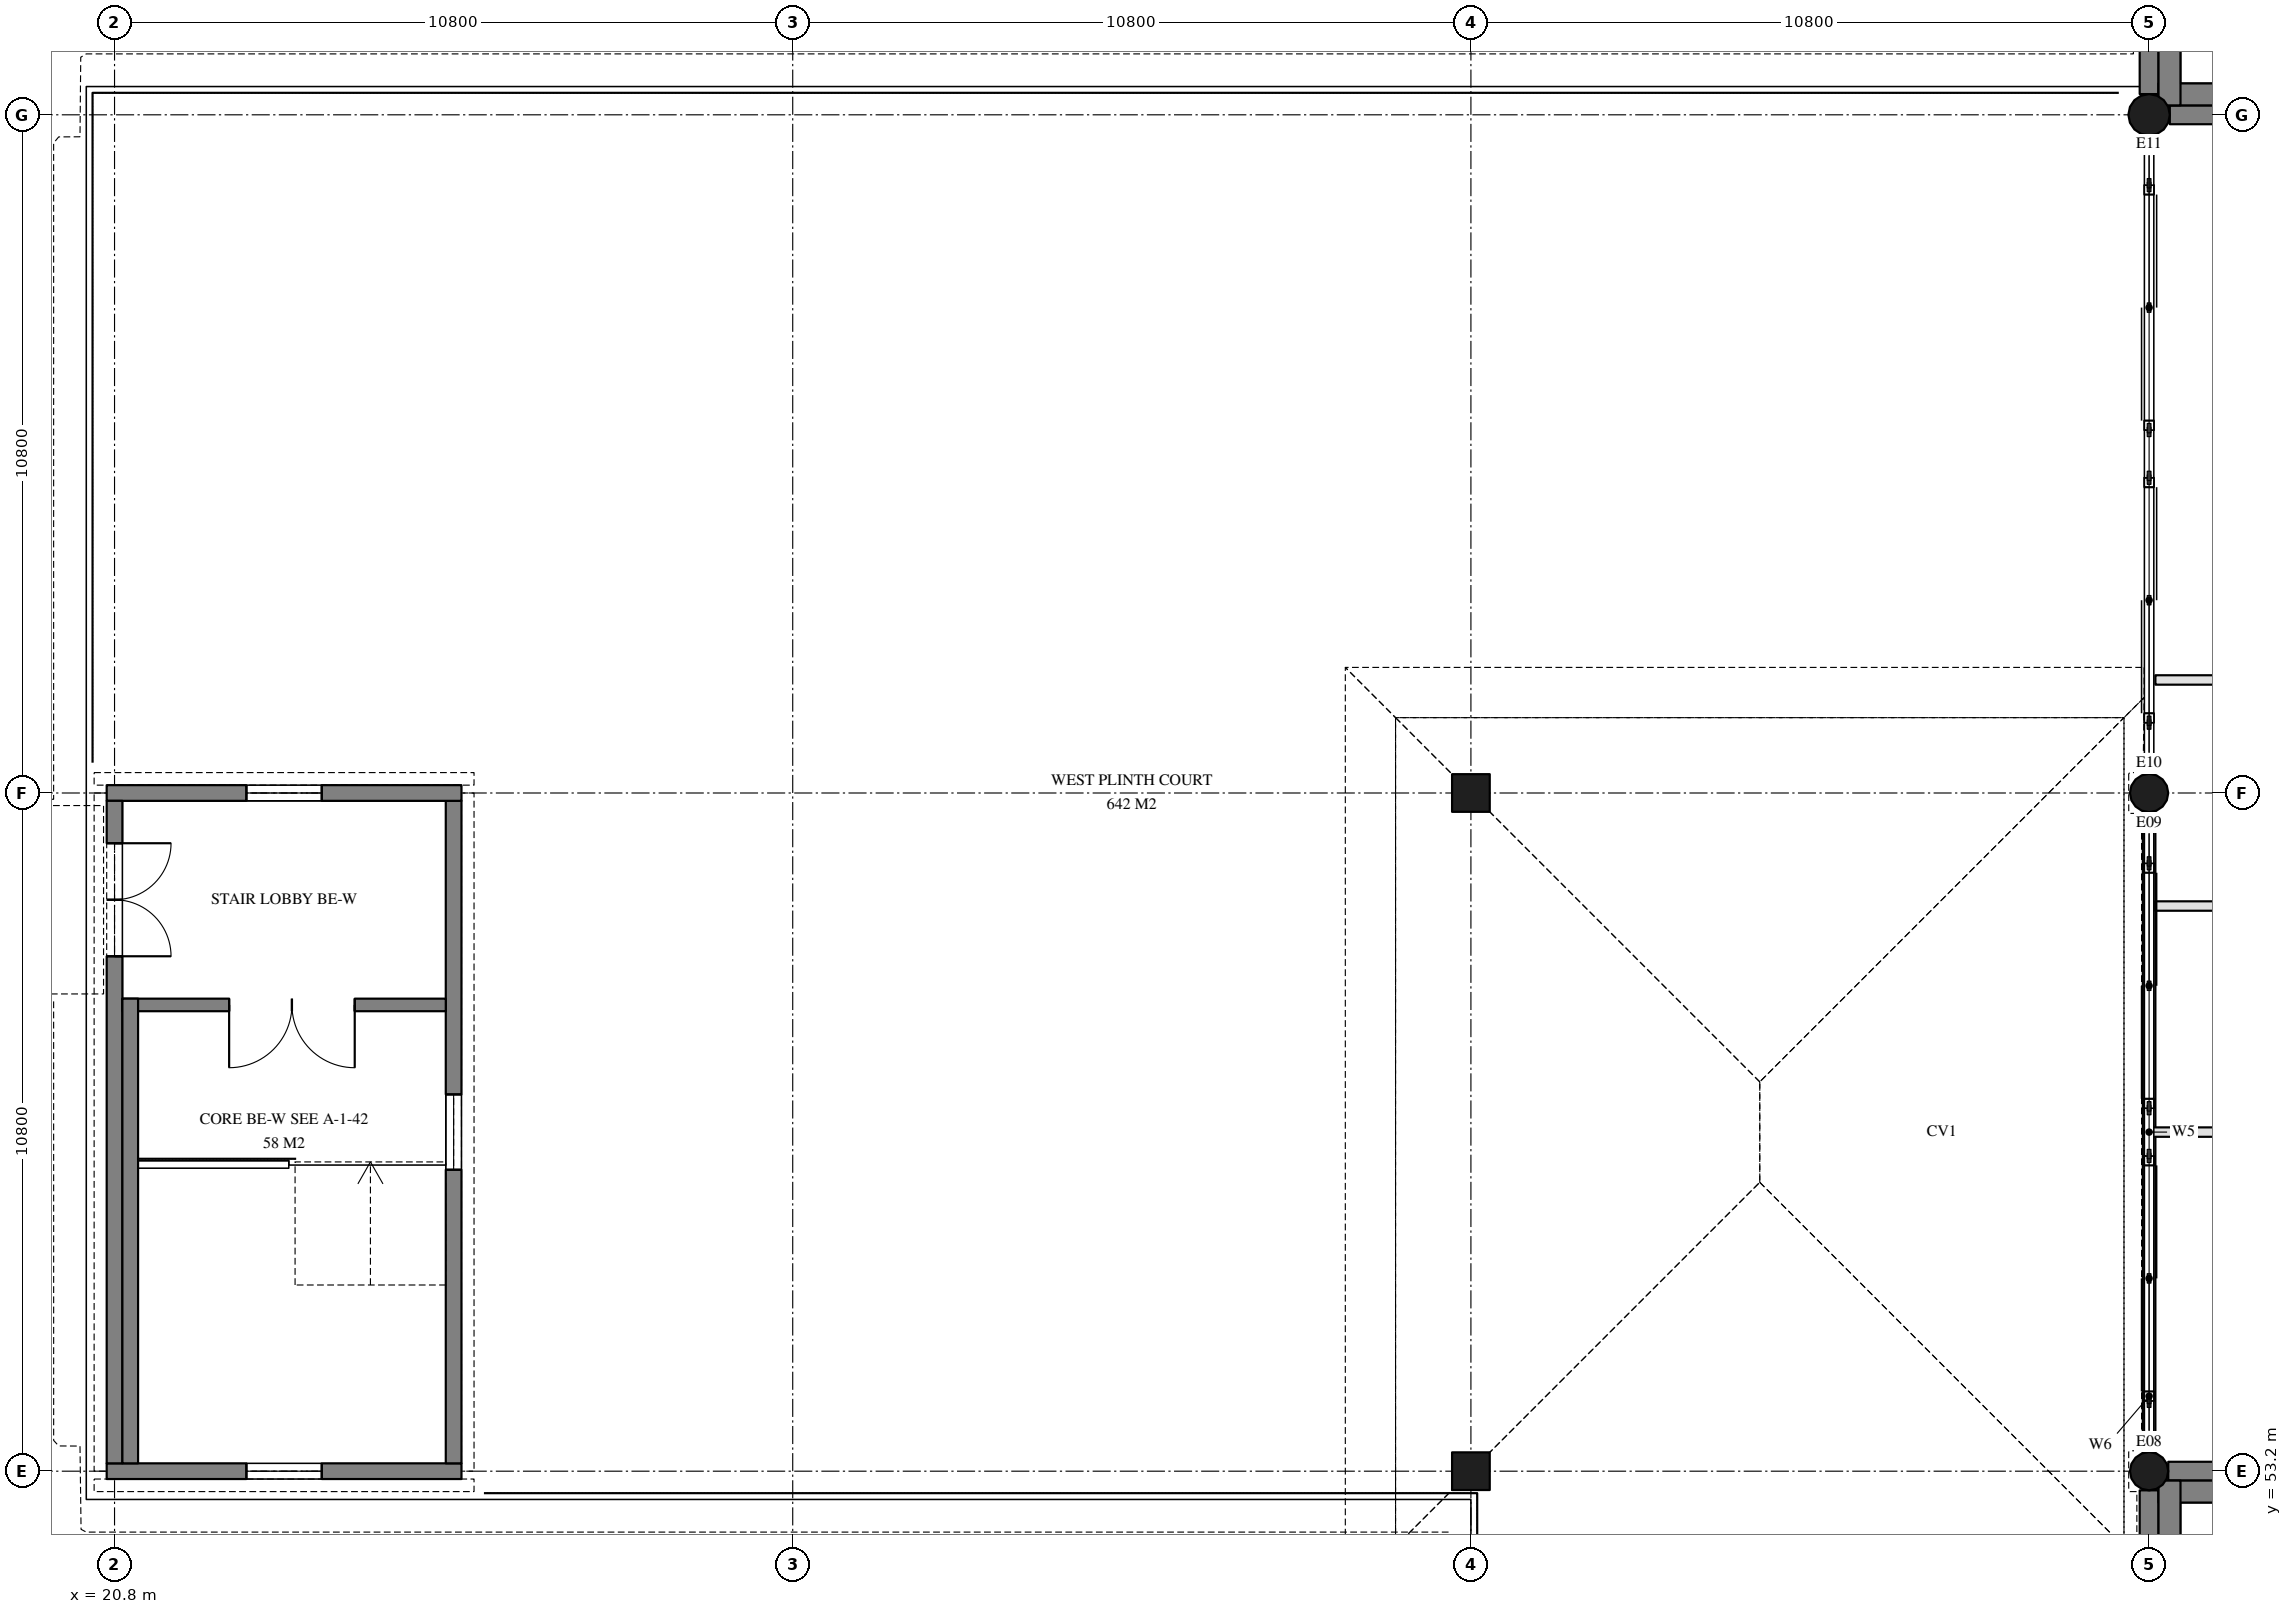
"""IFC4 building model, lengths in metres.
Left out: names, types, materials, properties, quantities, classifications, styles, units other than length and angle.
Written with IfcOpenShell. Run it as: python <this file> out.ifc"""

import sys

from ifc_helpers import new_model, si_unit, direction, frame, frame_2d, origin, origin_2d, place, context, subcontext, project, spatial, rectangle, hollow_circle, extrude, element, fill, save


model = new_model("IFC4")
c1 = context("Model", 3, precision=1e-05, world=origin(), true_north=direction((0.0, 1.0)))
c2 = subcontext(c1, "Body", "Model", "MODEL_VIEW")
j1 = project(units=[si_unit("LENGTHUNIT", "METRE"), si_unit("PLANEANGLEUNIT", "RADIAN")], contexts=[c1])
p1 = place(None, origin())
s1 = spatial("IfcSite", under=j1, at=p1, CompositionType="ELEMENT")
p2 = place(p1, origin())
s2 = spatial("IfcBuilding", under=s1, at=p2, CompositionType="ELEMENT")
p3 = place(p2, origin())
s3 = spatial("IfcBuildingStorey", under=s2, at=p3, CompositionType="ELEMENT", Elevation=0.0)
for number, where, z_axis, x_axis in (
    (1, (53.2, 53.2, 0.0), (0.0, 0.0, 1.0), (1.0, 0.0, 0.0)),
    (2, (53.2, 64.0, 0.0), (0.0, 0.0, 1.0), (1.0, 0.0, 0.0)),
):
    element("IfcColumn", number, at=place(p3, frame(where, z_axis=z_axis, x_axis=x_axis)), inside=s3, PredefinedType="COLUMN", context=c2, shape_type="SweptSolid", body=[
        extrude(hollow_circle(Radius=0.305, WallThickness=0.025, at=origin_2d()), origin(), (0.0, 0.0, 1.0), 4.8),
    ])
p4 = place(p3, frame((53.2, 74.8, 0.0), z_axis=(0.0, 0.0, 1.0), x_axis=(1.0, 0.0, 0.0)))
e3 = element("IfcColumn", 3, at=p4, inside=s3, PredefinedType="COLUMN", context=c2, shape_type="SweptSolid", body=[
    extrude(hollow_circle(Radius=0.33, WallThickness=0.025, at=origin_2d()), origin(), (0.0, 0.0, 1.0), 4.8),
])
for number, where, z_axis, x_axis in (
    (4, (42.4, 53.2, 0.0), (0.0, 0.0, 1.0), (1.0, 0.0, 0.0)),
    (5, (42.4, 64.0, 0.0), (0.0, 0.0, 1.0), (1.0, 0.0, 0.0)),
):
    element("IfcColumn", number, at=place(p3, frame(where, z_axis=z_axis, x_axis=x_axis)), inside=s3, PredefinedType="COLUMN", context=c2, shape_type="SweptSolid", body=[
        extrude(rectangle(XDim=0.6, YDim=0.6, at=origin_2d()), origin(), (0.0, 0.0, 1.0), 4.5),
    ])
p5 = place(p3, frame((53.53, 74.8, 0.0), z_axis=(0.0, 0.0, 1.0), x_axis=(1.0, 0.0, 0.0)))
e6 = element("IfcWall", 6, at=p5, inside=s3, PredefinedType="SOLIDWALL", context=c2, shape_type="SweptSolid", body=[
    extrude(rectangle(XDim=10.165, YDim=0.3, at=frame_2d((5.083, 0.0))), origin(), (0.0, 0.0, 1.0), 4.8),
])
p6 = place(p3, frame((53.2, 85.27, 0.0), z_axis=(0.0, 0.0, 1.0), x_axis=(0.0, -1.0, 0.0)))
e7 = element("IfcWall", 7, at=p6, inside=s3, PredefinedType="SOLIDWALL", context=c2, shape_type="SweptSolid", body=[
    extrude(rectangle(XDim=10.14, YDim=0.3, at=frame_2d((5.07, 0.0))), origin(), (0.0, 0.0, 1.0), 4.8),
])
p7 = place(p3, frame((63.72, 53.2, 0.0), z_axis=(0.0, 0.0, 1.0), x_axis=(-1.0, 0.0, 0.0)))
e8 = element("IfcWall", 8, at=p7, inside=s3, PredefinedType="SOLIDWALL", context=c2, shape_type="SweptSolid", body=[
    extrude(rectangle(XDim=10.216, YDim=0.3, at=frame_2d((5.108, 0.0))), origin(), (0.0, 0.0, 1.0), 4.8),
])
p8 = place(p3, frame((53.2, 52.895, 0.0), z_axis=(0.0, 0.0, 1.0), x_axis=(0.0, -1.0, 0.0)))
e9 = element("IfcWall", 9, at=p8, inside=s3, PredefinedType="SOLIDWALL", context=c2, shape_type="SweptSolid", body=[
    extrude(rectangle(XDim=10.19, YDim=0.3, at=frame_2d((5.095, 0.0))), origin(), (0.0, 0.0, 1.0), 4.8),
])
p9 = place(p3, frame((20.675, 53.2, 0.0), z_axis=(0.0, 0.0, 1.0), x_axis=(1.0, 0.0, 0.0)))
e10 = element("IfcWall", 10, at=p9, inside=s3, PredefinedType="SOLIDWALL", context=c2, shape_type="SweptSolid", body=[
    extrude(rectangle(XDim=5.65, YDim=0.25, at=frame_2d((2.825, 0.0))), origin(), (0.0, 0.0, 1.0), 4.8),
])
p10 = place(p9, frame((2.225, 0.0, 0.9)))
e11 = element("IfcOpeningElement", 11, at=p10, cuts=e10, PredefinedType="OPENING", context=c2, shape_type="SweptSolid", body=[
    extrude(rectangle(XDim=1.2, YDim=1.8, at=frame_2d((0.6, 0.9))), frame((0.0, 0.135, 0.0), z_axis=(0.0, -1.0, 0.0), x_axis=(1.0, 0.0, 0.0)), (0.0, 0.0, 1.0), 0.27),
])
p11 = place(p3, frame((26.2, 53.325, 0.0), z_axis=(0.0, 0.0, 1.0), x_axis=(0.0, 1.0, 0.0)))
e12 = element("IfcWall", 12, at=p11, inside=s3, PredefinedType="SOLIDWALL", context=c2, shape_type="SweptSolid", body=[
    extrude(rectangle(XDim=10.55, YDim=0.25, at=frame_2d((5.275, 0.0))), origin(), (0.0, 0.0, 1.0), 4.8),
])
p12 = place(p11, frame((4.675, 0.0, 0.9)))
e13 = element("IfcOpeningElement", 13, at=p12, cuts=e12, PredefinedType="OPENING", context=c2, shape_type="SweptSolid", body=[
    extrude(rectangle(XDim=1.2, YDim=1.8, at=frame_2d((0.6, 0.9))), frame((0.0, 0.135, 0.0), z_axis=(0.0, -1.0, 0.0), x_axis=(1.0, 0.0, 0.0)), (0.0, 0.0, 1.0), 0.27),
])
p13 = place(p3, frame((26.325, 64.0, 0.0), z_axis=(0.0, 0.0, 1.0), x_axis=(-1.0, 0.0, 0.0)))
e14 = element("IfcWall", 14, at=p13, inside=s3, PredefinedType="SOLIDWALL", context=c2, shape_type="SweptSolid", body=[
    extrude(rectangle(XDim=5.65, YDim=0.25, at=frame_2d((2.825, 0.0))), origin(), (0.0, 0.0, 1.0), 4.8),
])
p14 = place(p13, frame((2.225, 0.0, 0.9)))
e15 = element("IfcOpeningElement", 15, at=p14, cuts=e14, PredefinedType="OPENING", context=c2, shape_type="SweptSolid", body=[
    extrude(rectangle(XDim=1.2, YDim=1.8, at=frame_2d((0.6, 0.9))), frame((0.0, 0.135, 0.0), z_axis=(0.0, -1.0, 0.0), x_axis=(1.0, 0.0, 0.0)), (0.0, 0.0, 1.0), 0.27),
])
p15 = place(p3, frame((20.8, 63.875, 0.0), z_axis=(0.0, 0.0, 1.0), x_axis=(0.0, -1.0, 0.0)))
e16 = element("IfcWall", 16, at=p15, inside=s3, PredefinedType="SOLIDWALL", context=c2, shape_type="SweptSolid", body=[
    extrude(rectangle(XDim=10.55, YDim=0.25, at=frame_2d((5.275, 0.0))), origin(), (0.0, 0.0, 1.0), 4.8),
])
p16 = place(p15, frame((0.675, 0.0, 0.0)))
e17 = element("IfcOpeningElement", 17, at=p16, cuts=e16, PredefinedType="OPENING", context=c2, shape_type="SweptSolid", body=[
    extrude(rectangle(XDim=1.8, YDim=2.4, at=frame_2d((0.9, 1.2))), frame((0.0, 0.135, 0.0), z_axis=(0.0, -1.0, 0.0), x_axis=(1.0, 0.0, 0.0)), (0.0, 0.0, 1.0), 0.27),
])
p17 = place(p3, frame((53.2, 53.48, 4.5), z_axis=(0.0, 0.0, 1.0), x_axis=(0.0, 1.0, 0.0)))
e18 = element("IfcWall", 18, at=p17, inside=s3, PredefinedType="SOLIDWALL", context=c2, shape_type="SweptSolid", body=[
    extrude(rectangle(XDim=10.24, YDim=0.2, at=frame_2d((5.12, 0.0))), origin(), (0.0, 0.0, 1.0), 0.3),
])
p18 = place(p3, frame((53.2, 54.32, 0.0), z_axis=(0.0, 0.0, 1.0), x_axis=(0.0, 1.0, 0.0)))
e19 = element("IfcWall", 19, at=p18, inside=s3, PredefinedType="SOLIDWALL", context=c2, shape_type="SweptSolid", body=[
    extrude(rectangle(XDim=3.9, YDim=0.15, at=frame_2d((1.95, 0.0))), origin(), (0.0, 0.0, 1.0), 2.6),
])
p19 = place(p18, frame((0.15, 0.0, 0.0)))
e20 = element("IfcOpeningElement", 20, at=p19, cuts=e19, PredefinedType="OPENING", context=c2, shape_type="SweptSolid", body=[
    extrude(rectangle(XDim=3.6, YDim=2.4, at=frame_2d((1.8, 1.2))), frame((0.0, 0.085, 0.0), z_axis=(0.0, -1.0, 0.0), x_axis=(1.0, 0.0, 0.0)), (0.0, 0.0, 1.0), 0.17),
])
p20 = place(p3, frame((53.2, 58.98, 0.0), z_axis=(0.0, 0.0, 1.0), x_axis=(0.0, 1.0, 0.0)))
e21 = element("IfcWall", 21, at=p20, inside=s3, PredefinedType="SOLIDWALL", context=c2, shape_type="SweptSolid", body=[
    extrude(rectangle(XDim=3.9, YDim=0.15, at=frame_2d((1.95, 0.0))), origin(), (0.0, 0.0, 1.0), 2.6),
])
p21 = place(p20, frame((0.15, 0.0, 0.0)))
e22 = element("IfcOpeningElement", 22, at=p21, cuts=e21, PredefinedType="OPENING", context=c2, shape_type="SweptSolid", body=[
    extrude(rectangle(XDim=3.6, YDim=2.4, at=frame_2d((1.8, 1.2))), frame((0.0, 0.085, 0.0), z_axis=(0.0, -1.0, 0.0), x_axis=(1.0, 0.0, 0.0)), (0.0, 0.0, 1.0), 0.17),
])
p22 = place(p3, frame((53.2, 65.12, 0.0), z_axis=(0.0, 0.0, 1.0), x_axis=(0.0, 1.0, 0.0)))
e23 = element("IfcWall", 23, at=p22, inside=s3, PredefinedType="SOLIDWALL", context=c2, shape_type="SweptSolid", body=[
    extrude(rectangle(XDim=3.9, YDim=0.15, at=frame_2d((1.95, 0.0))), origin(), (0.0, 0.0, 1.0), 2.6),
])
p23 = place(p22, frame((0.15, 0.0, 0.0)))
e24 = element("IfcOpeningElement", 24, at=p23, cuts=e23, PredefinedType="OPENING", context=c2, shape_type="SweptSolid", body=[
    extrude(rectangle(XDim=3.6, YDim=2.4, at=frame_2d((1.8, 1.2))), frame((0.0, 0.085, 0.0), z_axis=(0.0, -1.0, 0.0), x_axis=(1.0, 0.0, 0.0)), (0.0, 0.0, 1.0), 0.17),
])
p24 = place(p3, frame((53.2, 69.78, 0.0), z_axis=(0.0, 0.0, 1.0), x_axis=(0.0, 1.0, 0.0)))
e25 = element("IfcWall", 25, at=p24, inside=s3, PredefinedType="SOLIDWALL", context=c2, shape_type="SweptSolid", body=[
    extrude(rectangle(XDim=3.9, YDim=0.15, at=frame_2d((1.95, 0.0))), origin(), (0.0, 0.0, 1.0), 2.6),
])
p25 = place(p24, frame((0.15, 0.0, 0.0)))
e26 = element("IfcOpeningElement", 26, at=p25, cuts=e25, PredefinedType="OPENING", context=c2, shape_type="SweptSolid", body=[
    extrude(rectangle(XDim=3.6, YDim=2.4, at=frame_2d((1.8, 1.2))), frame((0.0, 0.085, 0.0), z_axis=(0.0, -1.0, 0.0), x_axis=(1.0, 0.0, 0.0)), (0.0, 0.0, 1.0), 0.17),
])
p26 = place(p3, frame((60.7, 75.125, -0.6), z_axis=(0.0, 0.0, 1.0), x_axis=(-1.0, 0.0, 0.0)))
e27 = element("IfcWall", 27, at=p26, inside=s3, PredefinedType="SOLIDWALL", context=c2, shape_type="SweptSolid", body=[
    extrude(rectangle(XDim=7.35, YDim=0.35, at=frame_2d((3.675, 0.0))), origin(), (0.0, 0.0, 1.0), 5.0),
])
p27 = place(p3, frame((53.525, 74.95, -0.6), z_axis=(0.0, 0.0, 1.0), x_axis=(0.0, 1.0, 0.0)))
e28 = element("IfcWall", 28, at=p27, inside=s3, PredefinedType="SOLIDWALL", context=c2, shape_type="SweptSolid", body=[
    extrude(rectangle(XDim=3.5, YDim=0.35, at=frame_2d((1.75, 0.0))), origin(), (0.0, 0.0, 1.0), 5.0),
])
p28 = place(p3, frame((60.7, 52.875, -0.6), z_axis=(0.0, 0.0, 1.0), x_axis=(-1.0, 0.0, 0.0)))
e29 = element("IfcWall", 29, at=p28, inside=s3, PredefinedType="SOLIDWALL", context=c2, shape_type="SweptSolid", body=[
    extrude(rectangle(XDim=7.35, YDim=0.35, at=frame_2d((3.675, 0.0))), origin(), (0.0, 0.0, 1.0), 5.0),
])
p29 = place(p3, frame((53.525, 49.55, -0.6), z_axis=(0.0, 0.0, 1.0), x_axis=(0.0, 1.0, 0.0)))
e30 = element("IfcWall", 30, at=p29, inside=s3, PredefinedType="SOLIDWALL", context=c2, shape_type="SweptSolid", body=[
    extrude(rectangle(XDim=3.5, YDim=0.35, at=frame_2d((1.75, 0.0))), origin(), (0.0, 0.0, 1.0), 5.0),
])
p30 = place(p3, frame((26.075, 60.625, 0.0), z_axis=(0.0, 0.0, 1.0), x_axis=(-1.0, 0.0, 0.0)))
e31 = element("IfcWall", 31, at=p30, inside=s3, PredefinedType="SOLIDWALL", context=c2, shape_type="SweptSolid", body=[
    extrude(rectangle(XDim=5.15, YDim=0.2, at=frame_2d((2.575, 0.0))), origin(), (0.0, 0.0, 1.0), 4.4),
])
p31 = place(p30, frame((1.45, 0.0, 0.0)))
e32 = element("IfcOpeningElement", 32, at=p31, cuts=e31, PredefinedType="OPENING", context=c2, shape_type="SweptSolid", body=[
    extrude(rectangle(XDim=2.0, YDim=2.1, at=frame_2d((1.0, 1.05))), frame((0.0, 0.11, 0.0), z_axis=(0.0, -1.0, 0.0), x_axis=(1.0, 0.0, 0.0)), (0.0, 0.0, 1.0), 0.22),
])
p32 = place(p3, frame((21.05, 60.725, 0.0), z_axis=(0.0, 0.0, 1.0), x_axis=(0.0, -1.0, 0.0)))
e33 = element("IfcWall", 33, at=p32, inside=s3, PredefinedType="SOLIDWALL", context=c2, shape_type="SweptSolid", body=[
    extrude(rectangle(XDim=7.4, YDim=0.25, at=frame_2d((3.7, 0.0))), origin(), (0.0, 0.0, 1.0), 4.4),
])
p33 = place(p3, frame((53.2, 58.6, 0.0), z_axis=(0.0, 0.0, 1.0), x_axis=(1.0, 0.0, 0.0)))
e34 = element("IfcWall", 34, at=p33, inside=s3, PredefinedType="PARTITIONING", context=c2, shape_type="SweptSolid", body=[
    extrude(rectangle(XDim=5.4, YDim=0.15, at=frame_2d((2.7, 0.0))), origin(), (0.0, 0.0, 1.0), 3.9),
])
p34 = place(p33, frame((2.2, 0.0, 0.0)))
e35 = element("IfcOpeningElement", 35, at=p34, cuts=e34, PredefinedType="OPENING", context=c2, shape_type="SweptSolid", body=[
    extrude(rectangle(XDim=1.0, YDim=2.1, at=frame_2d((0.5, 1.05))), frame((0.0, 0.085, 0.0), z_axis=(0.0, -1.0, 0.0), x_axis=(1.0, 0.0, 0.0)), (0.0, 0.0, 1.0), 0.17),
])
p35 = place(p3, frame((53.3, 62.2, 0.0), z_axis=(0.0, 0.0, 1.0), x_axis=(1.0, 0.0, 0.0)))
e36 = element("IfcWall", 36, at=p35, inside=s3, PredefinedType="PARTITIONING", context=c2, shape_type="SweptSolid", body=[
    extrude(rectangle(XDim=5.3, YDim=0.15, at=frame_2d((2.65, 0.0))), origin(), (0.0, 0.0, 1.0), 3.9),
])
p36 = place(p3, frame((53.3, 65.8, 0.0), z_axis=(0.0, 0.0, 1.0), x_axis=(1.0, 0.0, 0.0)))
e37 = element("IfcWall", 37, at=p36, inside=s3, PredefinedType="PARTITIONING", context=c2, shape_type="SweptSolid", body=[
    extrude(rectangle(XDim=10.7, YDim=0.15, at=frame_2d((5.35, 0.0))), origin(), (0.0, 0.0, 1.0), 3.9),
])
p37 = place(p19, origin())
e38 = element("IfcDoor", 38, at=p37, inside=s3, OperationType="DOUBLE_DOOR_SLIDING", PredefinedType="DOOR", context=c2, shape_type="SweptSolid", body=[
    extrude(rectangle(XDim=3.6, YDim=2.4, at=frame_2d((1.8, 1.2))), frame((0.0, 0.025, 0.0), z_axis=(0.0, -1.0, 0.0), x_axis=(1.0, 0.0, 0.0)), (0.0, 0.0, 1.0), 0.05),
])
fill(e20, e38)
p38 = place(p21, origin())
e39 = element("IfcDoor", 39, at=p38, inside=s3, OperationType="DOUBLE_DOOR_SLIDING", PredefinedType="DOOR", context=c2, shape_type="SweptSolid", body=[
    extrude(rectangle(XDim=3.6, YDim=2.4, at=frame_2d((1.8, 1.2))), frame((0.0, 0.025, 0.0), z_axis=(0.0, -1.0, 0.0), x_axis=(1.0, 0.0, 0.0)), (0.0, 0.0, 1.0), 0.05),
])
fill(e22, e39)
p39 = place(p23, origin())
e40 = element("IfcDoor", 40, at=p39, inside=s3, OperationType="DOUBLE_DOOR_SLIDING", PredefinedType="DOOR", context=c2, shape_type="SweptSolid", body=[
    extrude(rectangle(XDim=3.6, YDim=2.4, at=frame_2d((1.8, 1.2))), frame((0.0, 0.025, 0.0), z_axis=(0.0, -1.0, 0.0), x_axis=(1.0, 0.0, 0.0)), (0.0, 0.0, 1.0), 0.05),
])
fill(e24, e40)
p40 = place(p25, origin())
e41 = element("IfcDoor", 41, at=p40, inside=s3, OperationType="DOUBLE_DOOR_SLIDING", PredefinedType="DOOR", context=c2, shape_type="SweptSolid", body=[
    extrude(rectangle(XDim=3.6, YDim=2.4, at=frame_2d((1.8, 1.2))), frame((0.0, 0.025, 0.0), z_axis=(0.0, -1.0, 0.0), x_axis=(1.0, 0.0, 0.0)), (0.0, 0.0, 1.0), 0.05),
])
fill(e26, e41)
p41 = place(p10, origin())
e42 = element("IfcWindow", 42, at=p41, inside=s3, PartitioningType="SINGLE_PANEL", PredefinedType="WINDOW", context=c2, shape_type="SweptSolid", body=[
    extrude(rectangle(XDim=1.2, YDim=1.8, at=frame_2d((0.6, 0.9))), frame((0.0, 0.03, 0.0), z_axis=(0.0, -1.0, 0.0), x_axis=(1.0, 0.0, 0.0)), (0.0, 0.0, 1.0), 0.06),
])
fill(e11, e42)
p42 = place(p12, origin())
e43 = element("IfcWindow", 43, at=p42, inside=s3, PartitioningType="SINGLE_PANEL", PredefinedType="WINDOW", context=c2, shape_type="SweptSolid", body=[
    extrude(rectangle(XDim=1.2, YDim=1.8, at=frame_2d((0.6, 0.9))), frame((0.0, 0.03, 0.0), z_axis=(0.0, -1.0, 0.0), x_axis=(1.0, 0.0, 0.0)), (0.0, 0.0, 1.0), 0.06),
])
fill(e13, e43)
p43 = place(p14, origin())
e44 = element("IfcWindow", 44, at=p43, inside=s3, PartitioningType="SINGLE_PANEL", PredefinedType="WINDOW", context=c2, shape_type="SweptSolid", body=[
    extrude(rectangle(XDim=1.2, YDim=1.8, at=frame_2d((0.6, 0.9))), frame((0.0, 0.03, 0.0), z_axis=(0.0, -1.0, 0.0), x_axis=(1.0, 0.0, 0.0)), (0.0, 0.0, 1.0), 0.06),
])
fill(e15, e44)
p44 = place(p16, frame((1.8, 0.0, 0.0), z_axis=(0.0, 0.0, 1.0), x_axis=(-1.0, 0.0, 0.0)))
e45 = element("IfcDoor", 45, at=p44, inside=s3, OperationType="DOUBLE_DOOR_DOUBLE_SWING", PredefinedType="DOOR", context=c2, shape_type="SweptSolid", body=[
    extrude(rectangle(XDim=1.8, YDim=2.4, at=frame_2d((0.9, 1.2))), frame((0.0, 0.025, 0.0), z_axis=(0.0, -1.0, 0.0), x_axis=(1.0, 0.0, 0.0)), (0.0, 0.0, 1.0), 0.05),
])
fill(e17, e45)
p45 = place(p31, frame((2.0, 0.0, 0.0), z_axis=(0.0, 0.0, 1.0), x_axis=(-1.0, 0.0, 0.0)))
e46 = element("IfcDoor", 46, at=p45, inside=s3, OperationType="DOUBLE_DOOR_DOUBLE_SWING", PredefinedType="DOOR", context=c2, shape_type="SweptSolid", body=[
    extrude(rectangle(XDim=2.0, YDim=2.1, at=frame_2d((1.0, 1.05))), frame((0.0, 0.025, 0.0), z_axis=(0.0, -1.0, 0.0), x_axis=(1.0, 0.0, 0.0)), (0.0, 0.0, 1.0), 0.05),
])
fill(e32, e46)
save(model, sys.argv[1])
